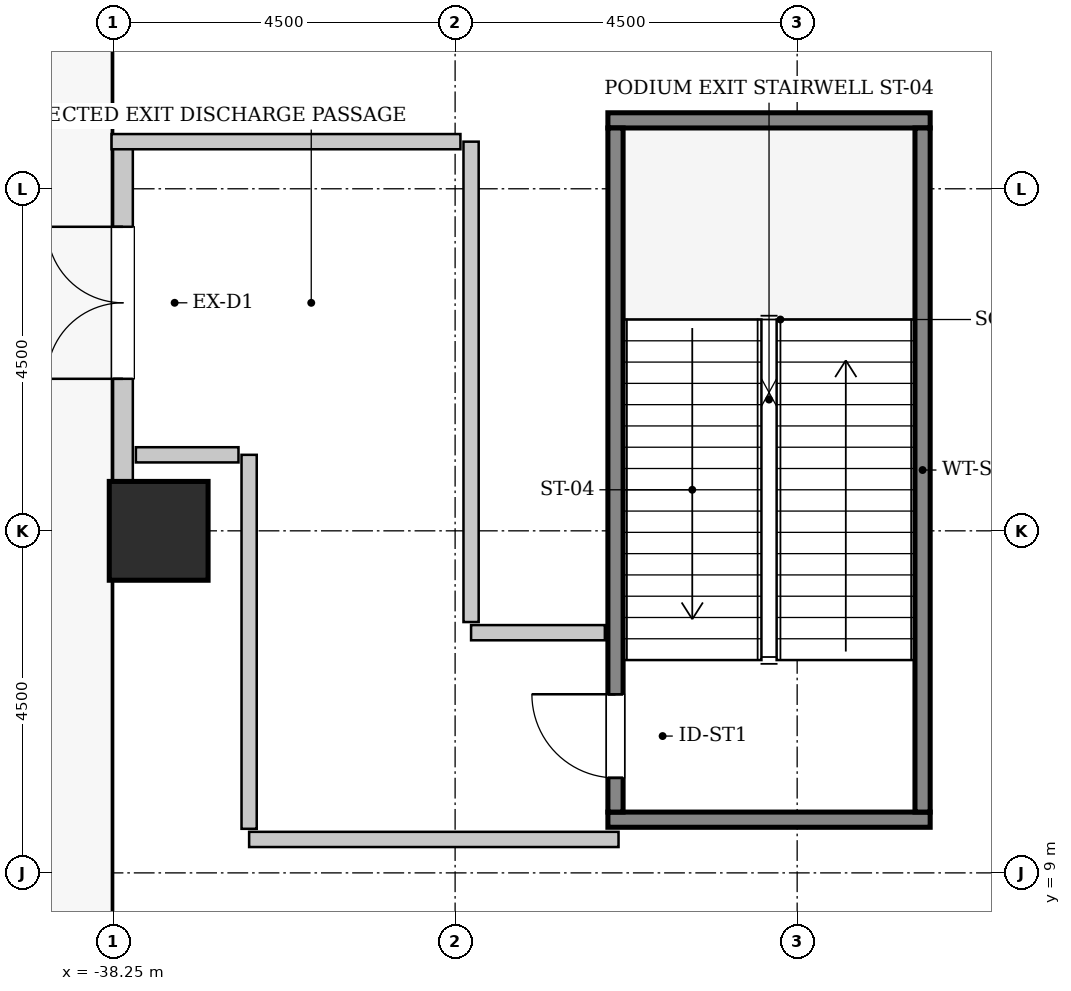
"""IFC4 building model, lengths in metres.
Left out: names, types, materials, properties, quantities, classifications, styles, units other than length and angle.
Written with IfcOpenShell. Run it as: python <this file> out.ifc"""

import sys

from ifc_helpers import new_model, si_unit, direction, frame, frame_2d, origin, origin_2d, place, context, subcontext, project, spatial, rectangle, hollow_rectangle, extrude, source, transform, mapped, element, fill, save


model = new_model("IFC4")
c1 = context("Model", 3, precision=1e-05, world=origin(), true_north=direction((0.0, 1.0)))
c2 = subcontext(c1, "Body", "Model", "MODEL_VIEW")
j1 = project(units=[si_unit("LENGTHUNIT", "METRE"), si_unit("PLANEANGLEUNIT", "RADIAN")], contexts=[c1])
p1 = place(None, origin())
s1 = spatial("IfcSite", under=j1, at=p1, CompositionType="ELEMENT")
p2 = place(p1, origin())
s2 = spatial("IfcBuilding", under=s1, at=p2, CompositionType="ELEMENT")
p3 = place(p2, origin())
s3 = spatial("IfcBuildingStorey", under=s2, at=p3, CompositionType="ELEMENT", Elevation=0.0)
m1 = source(origin(), c2, "Body", "SweptSolid", [
    extrude(hollow_rectangle(XDim=1.3, YDim=1.3, WallThickness=0.065, InnerFilletRadius=0.065, OuterFilletRadius=0.13, at=origin_2d()), origin(), (0.0, 0.0, 1.0), 6.0),
])
p4 = place(p3, frame((-37.65, 13.5, 0.0), z_axis=(0.0, 0.0, 1.0), x_axis=(1.0, 0.0, 0.0)))
e1 = element("IfcColumn", 1, at=p4, inside=s3, PredefinedType="COLUMN", context=c2, shape_type="MappedRepresentation", body=[
    mapped(m1, transform((0.0, 0.0, 0.0), x_axis=(1.0, 0.0, 0.0), y_axis=(0.0, 1.0, 0.0), z_axis=(0.0, 0.0, 1.0), scale=1.0)),
])
m2 = source(origin(), c2, "Body", "SweptSolid", [
    extrude(rectangle(XDim=4.41, YDim=0.26, at=frame_2d((2.205, 0.0))), origin(), (0.0, 0.0, 1.0), 5.7),
])
p5 = place(p3, frame((-38.12, 14.13, 0.0), z_axis=(0.0, 0.0, 1.0), x_axis=(0.0, 1.0, 0.0)))
e2 = element("IfcWall", 2, at=p5, inside=s3, PredefinedType="SOLIDWALL", context=c2, shape_type="MappedRepresentation", body=[
    mapped(m2, transform((0.0, 0.0, 0.0), x_axis=(1.0, 0.0, 0.0), y_axis=(0.0, 1.0, 0.0), z_axis=(0.0, 0.0, 1.0), scale=1.0)),
])
p6 = place(p5, frame((1.37, 0.0, 0.0)))
e3 = element("IfcOpeningElement", 3, at=p6, cuts=e2, PredefinedType="OPENING", context=c2, shape_type="SweptSolid", body=[
    extrude(rectangle(XDim=2.0, YDim=2.4, at=frame_2d((1.0, 1.2))), frame((0.0, 0.14, 0.0), z_axis=(0.0, -1.0, 0.0), x_axis=(1.0, 0.0, 0.0)), (0.0, 0.0, 1.0), 0.28),
])
m3 = source(origin(), c2, "Body", "SweptSolid", [
    extrude(rectangle(XDim=4.24, YDim=0.2, at=frame_2d((2.12, 0.0))), origin(), (0.0, 0.0, 1.0), 6.0),
])
for number, where, z_axis, x_axis in (
    (4, (-27.5, 9.7, 0.0), (0.0, 0.0, 1.0), (-1.0, 0.0, 0.0)),
    (5, (-27.5, 18.9, 0.0), (0.0, 0.0, 1.0), (-1.0, 0.0, 0.0)),
):
    element("IfcWall", number, at=place(p3, frame(where, z_axis=z_axis, x_axis=x_axis)), inside=s3, PredefinedType="SOLIDWALL", context=c2, shape_type="MappedRepresentation", body=[
        mapped(m3, transform((0.0, 0.0, 0.0), x_axis=(1.0, 0.0, 0.0), y_axis=(0.0, 1.0, 0.0), z_axis=(0.0, 0.0, 1.0), scale=1.0)),
    ])
m4 = source(origin(), c2, "Body", "SweptSolid", [
    extrude(rectangle(XDim=9.0, YDim=0.2, at=frame_2d((4.5, 0.0))), origin(), (0.0, 0.0, 1.0), 6.0),
])
p7 = place(p3, frame((-27.6, 9.8, 0.0), z_axis=(0.0, 0.0, 1.0), x_axis=(0.0, 1.0, 0.0)))
e6 = element("IfcWall", 6, at=p7, inside=s3, PredefinedType="SOLIDWALL", context=c2, shape_type="MappedRepresentation", body=[
    mapped(m4, transform((0.0, 0.0, 0.0), x_axis=(1.0, 0.0, 0.0), y_axis=(0.0, 1.0, 0.0), z_axis=(0.0, 0.0, 1.0), scale=1.0)),
])
p8 = place(p3, frame((-31.64, 9.8, 0.0), z_axis=(0.0, 0.0, 1.0), x_axis=(0.0, 1.0, 0.0)))
e7 = element("IfcWall", 7, at=p8, inside=s3, PredefinedType="SOLIDWALL", context=c2, shape_type="MappedRepresentation", body=[
    mapped(m4, transform((0.0, 0.0, 0.0), x_axis=(1.0, 0.0, 0.0), y_axis=(0.0, 1.0, 0.0), z_axis=(0.0, 0.0, 1.0), scale=1.0)),
])
p9 = place(p8, frame((0.45, 0.0, 0.0)))
e8 = element("IfcOpeningElement", 8, at=p9, cuts=e7, PredefinedType="OPENING", context=c2, shape_type="SweptSolid", body=[
    extrude(rectangle(XDim=1.1, YDim=2.15, at=frame_2d((0.55, 1.075))), frame((0.0, 0.11, 0.0), z_axis=(0.0, -1.0, 0.0), x_axis=(1.0, 0.0, 0.0)), (0.0, 0.0, 1.0), 0.22),
])
m5 = source(origin(), c2, "Body", "SweptSolid", [
    extrude(rectangle(XDim=4.86, YDim=0.2, at=frame_2d((2.43, 0.0))), origin(), (0.0, 0.0, 1.0), 5.685),
])
p10 = place(p3, frame((-36.46, 9.44, 0.0), z_axis=(0.0, 0.0, 1.0), x_axis=(1.0, 0.0, 0.0)))
e9 = element("IfcWall", 9, at=p10, inside=s3, PredefinedType="PARTITIONING", context=c2, shape_type="MappedRepresentation", body=[
    mapped(m5, transform((0.0, 0.0, 0.0), x_axis=(1.0, 0.0, 0.0), y_axis=(0.0, 1.0, 0.0), z_axis=(0.0, 0.0, 1.0), scale=1.0)),
])
m6 = source(origin(), c2, "Body", "SweptSolid", [
    extrude(rectangle(XDim=1.76, YDim=0.2, at=frame_2d((0.88, 0.0))), origin(), (0.0, 0.0, 1.0), 5.685),
])
p11 = place(p3, frame((-33.54, 12.16, 0.0), z_axis=(0.0, 0.0, 1.0), x_axis=(1.0, 0.0, 0.0)))
e10 = element("IfcWall", 10, at=p11, inside=s3, PredefinedType="PARTITIONING", context=c2, shape_type="MappedRepresentation", body=[
    mapped(m6, transform((0.0, 0.0, 0.0), x_axis=(1.0, 0.0, 0.0), y_axis=(0.0, 1.0, 0.0), z_axis=(0.0, 0.0, 1.0), scale=1.0)),
])
m7 = source(origin(), c2, "Body", "SweptSolid", [
    extrude(rectangle(XDim=6.32, YDim=0.2, at=frame_2d((3.16, 0.0))), origin(), (0.0, 0.0, 1.0), 5.685),
])
p12 = place(p3, frame((-33.54, 12.3, 0.0), z_axis=(0.0, 0.0, 1.0), x_axis=(0.0, 1.0, 0.0)))
e11 = element("IfcWall", 11, at=p12, inside=s3, PredefinedType="PARTITIONING", context=c2, shape_type="MappedRepresentation", body=[
    mapped(m7, transform((0.0, 0.0, 0.0), x_axis=(1.0, 0.0, 0.0), y_axis=(0.0, 1.0, 0.0), z_axis=(0.0, 0.0, 1.0), scale=1.0)),
])
m8 = source(origin(), c2, "Body", "SweptSolid", [
    extrude(rectangle(XDim=4.59, YDim=0.2, at=frame_2d((2.295, 0.0))), origin(), (0.0, 0.0, 1.0), 5.685),
])
p13 = place(p3, frame((-38.27, 18.62, 0.0), z_axis=(0.0, 0.0, 1.0), x_axis=(1.0, 0.0, 0.0)))
e12 = element("IfcWall", 12, at=p13, inside=s3, PredefinedType="PARTITIONING", context=c2, shape_type="MappedRepresentation", body=[
    mapped(m8, transform((0.0, 0.0, 0.0), x_axis=(1.0, 0.0, 0.0), y_axis=(0.0, 1.0, 0.0), z_axis=(0.0, 0.0, 1.0), scale=1.0)),
])
m9 = source(origin(), c2, "Body", "SweptSolid", [
    extrude(rectangle(XDim=4.92, YDim=0.2, at=frame_2d((2.46, 0.0))), origin(), (0.0, 0.0, 1.0), 5.685),
])
p14 = place(p3, frame((-36.46, 9.58, 0.0), z_axis=(0.0, 0.0, 1.0), x_axis=(0.0, 1.0, 0.0)))
e13 = element("IfcWall", 13, at=p14, inside=s3, PredefinedType="PARTITIONING", context=c2, shape_type="MappedRepresentation", body=[
    mapped(m9, transform((0.0, 0.0, 0.0), x_axis=(1.0, 0.0, 0.0), y_axis=(0.0, 1.0, 0.0), z_axis=(0.0, 0.0, 1.0), scale=1.0)),
])
m10 = source(origin(), c2, "Body", "SweptSolid", [
    extrude(rectangle(XDim=1.35, YDim=0.2, at=frame_2d((0.675, 0.0))), origin(), (0.0, 0.0, 1.0), 5.685),
])
p15 = place(p3, frame((-37.95, 14.5, 0.0), z_axis=(0.0, 0.0, 1.0), x_axis=(1.0, 0.0, 0.0)))
e14 = element("IfcWall", 14, at=p15, inside=s3, PredefinedType="PARTITIONING", context=c2, shape_type="MappedRepresentation", body=[
    mapped(m10, transform((0.0, 0.0, 0.0), x_axis=(1.0, 0.0, 0.0), y_axis=(0.0, 1.0, 0.0), z_axis=(0.0, 0.0, 1.0), scale=1.0)),
])
m11 = source(origin(), c2, "Body", "SweptSolid", [
    extrude(rectangle(XDim=2.0, YDim=2.4, at=frame_2d((1.0, 1.2))), frame((0.0, 0.025, 0.0), z_axis=(0.0, -1.0, 0.0), x_axis=(1.0, 0.0, 0.0)), (0.0, 0.0, 1.0), 0.05),
])
p16 = place(p6, origin())
e15 = element("IfcDoor", 15, at=p16, inside=s3, OperationType="DOUBLE_DOOR_SINGLE_SWING", PredefinedType="DOOR", context=c2, shape_type="MappedRepresentation", body=[
    mapped(m11, transform((0.0, 0.0, 0.0), x_axis=(1.0, 0.0, 0.0), y_axis=(0.0, 1.0, 0.0), z_axis=(0.0, 0.0, 1.0), scale=1.0)),
])
fill(e3, e15)
m12 = source(origin(), c2, "Body", "SweptSolid", [
    extrude(rectangle(XDim=1.1, YDim=2.15, at=frame_2d((0.55, 1.075))), frame((0.0, 0.025, 0.0), z_axis=(0.0, -1.0, 0.0), x_axis=(1.0, 0.0, 0.0)), (0.0, 0.0, 1.0), 0.05),
])
p17 = place(p9, origin())
e16 = element("IfcDoor", 16, at=p17, inside=s3, OperationType="SINGLE_SWING_RIGHT", PredefinedType="DOOR", context=c2, shape_type="MappedRepresentation", body=[
    mapped(m12, transform((0.0, 0.0, 0.0), x_axis=(1.0, 0.0, 0.0), y_axis=(0.0, 1.0, 0.0), z_axis=(0.0, 0.0, 1.0), scale=1.0)),
])
fill(e8, e16)
save(model, sys.argv[1])
